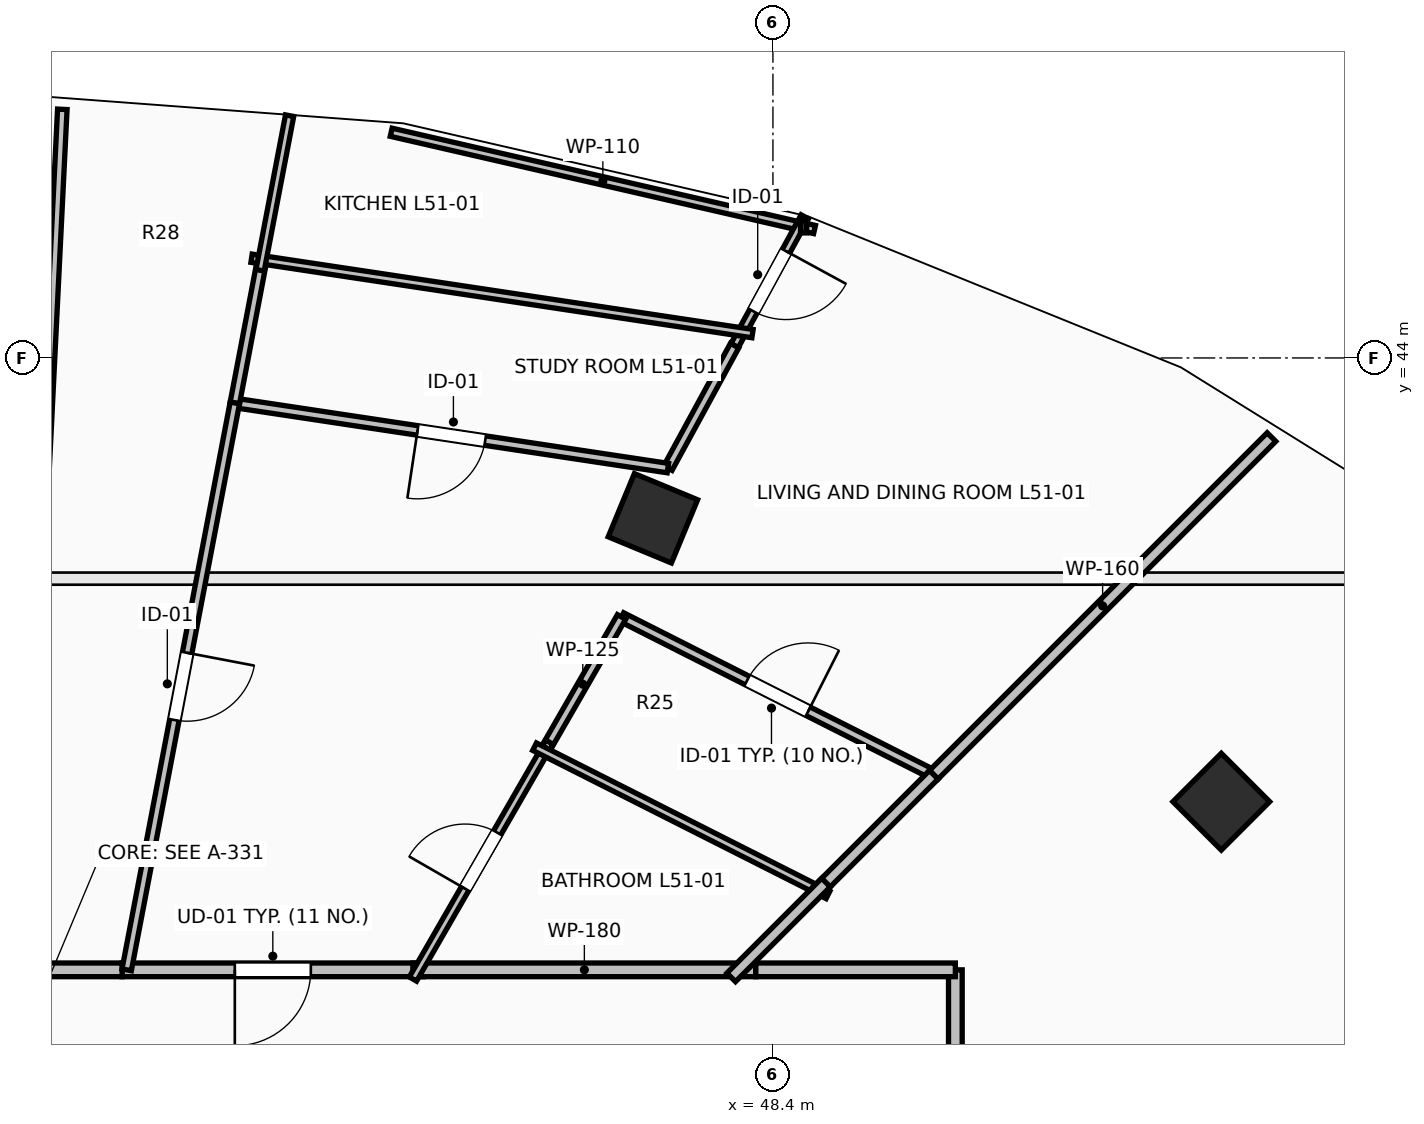
"""IFC4 building model, lengths in metres.
Left out: names, types, materials, properties, quantities, classifications, styles, units other than length and angle.
Written with IfcOpenShell. Run it as: python <this file> out.ifc"""

import sys

from ifc_helpers import new_model, si_unit, direction, frame, frame_2d, origin, origin_2d, place, context, subcontext, project, spatial, rectangle, extrude, element, fill, save


model = new_model("IFC4")
c1 = context("Model", 3, precision=1e-05, world=origin(), true_north=direction((0.0, 1.0)))
c2 = subcontext(c1, "Body", "Model", "MODEL_VIEW")
j1 = project(units=[si_unit("LENGTHUNIT", "METRE"), si_unit("PLANEANGLEUNIT", "RADIAN")], contexts=[c1])
p1 = place(None, origin())
s1 = spatial("IfcSite", under=j1, at=p1, CompositionType="ELEMENT")
p2 = place(p1, origin())
s2 = spatial("IfcBuilding", under=s1, at=p2, CompositionType="ELEMENT")
p3 = place(p2, frame((0.0, 0.0, 189.6)))
s3 = spatial("IfcBuildingStorey", under=s2, at=p3, CompositionType="ELEMENT", Elevation=189.6)
for number, where, z_axis, x_axis in (
    (1, (54.299, 38.162, 0.0), (0.0, 0.0, 1.0), (0.707, 0.707, 0.0)),
    (2, (46.821, 41.891, 0.0), (0.0, 0.0, 1.0), (0.383, 0.924, 0.0)),
):
    element("IfcColumn", number, at=place(p3, frame(where, z_axis=z_axis, x_axis=x_axis)), inside=s3, PredefinedType="COLUMN", context=c2, shape_type="SweptSolid", body=[
        extrude(rectangle(XDim=0.9, YDim=0.9, at=origin_2d()), origin(), (0.0, 0.0, 1.0), 3.5),
    ])
p4 = place(p3, frame((43.803, 35.95, 0.0), z_axis=(0.0, 0.0, 1.0), x_axis=(-1.0, 0.0, 0.0)))
e3 = element("IfcWall", 3, at=p4, inside=s3, PredefinedType="PARTITIONING", context=c2, shape_type="SweptSolid", body=[
    extrude(rectangle(XDim=3.965, YDim=0.18, at=frame_2d((1.982, 0.0))), origin(), (0.0, 0.0, 1.0), 3.24),
])
p5 = place(p4, frame((1.482, 0.0, 0.0)))
e4 = element("IfcOpeningElement", 4, at=p5, cuts=e3, PredefinedType="OPENING", context=c2, shape_type="SweptSolid", body=[
    extrude(rectangle(XDim=1.0, YDim=2.15, at=frame_2d((0.5, 1.075))), frame((0.0, 0.105, 0.0), z_axis=(0.0, -1.0, 0.0), x_axis=(1.0, 0.0, 0.0)), (0.0, 0.0, 1.0), 0.21),
])
p6 = place(p3, frame((48.175, 35.95, 0.0), z_axis=(0.0, 0.0, 1.0), x_axis=(-1.0, 0.0, 0.0)))
e5 = element("IfcWall", 5, at=p6, inside=s3, PredefinedType="PARTITIONING", context=c2, shape_type="SweptSolid", body=[
    extrude(rectangle(XDim=4.512, YDim=0.18, at=frame_2d((2.256, 0.0))), origin(), (0.0, 0.0, 1.0), 2.432),
])
p7 = place(p3, frame((39.838, 35.95, 0.0), z_axis=(0.0, 0.0, 1.0), x_axis=(-1.0, 0.0, 0.0)))
e6 = element("IfcWall", 6, at=p7, inside=s3, PredefinedType="PARTITIONING", context=c2, shape_type="SweptSolid", body=[
    extrude(rectangle(XDim=1.406, YDim=0.18, at=frame_2d((0.703, 0.0))), origin(), (0.0, 0.0, 1.0), 3.24),
])
p8 = place(p3, frame((50.8, 27.25, 0.0), z_axis=(0.0, 0.0, 1.0), x_axis=(0.0, 1.0, 0.0)))
e7 = element("IfcWall", 7, at=p8, inside=s3, PredefinedType="PARTITIONING", context=c2, shape_type="SweptSolid", body=[
    extrude(rectangle(XDim=8.7, YDim=0.18, at=frame_2d((4.35, 0.0))), origin(), (0.0, 0.0, 1.0), 2.432),
])
p9 = place(p3, frame((50.8, 35.95, 0.0), z_axis=(0.0, 0.0, 1.0), x_axis=(-1.0, 0.0, 0.0)))
e8 = element("IfcWall", 8, at=p9, inside=s3, PredefinedType="PARTITIONING", context=c2, shape_type="SweptSolid", body=[
    extrude(rectangle(XDim=2.625, YDim=0.18, at=frame_2d((1.312, 0.0))), origin(), (0.0, 0.0, 1.0), 2.432),
])
p10 = place(p3, frame((46.408, 40.592, 0.0), z_axis=(0.0, 0.0, 1.0), x_axis=(0.89252026196, -0.451007297049, 0.0)))
e9 = element("IfcWall", 9, at=p10, inside=s3, PredefinedType="PARTITIONING", context=c2, shape_type="SweptSolid", body=[
    extrude(rectangle(XDim=4.603, YDim=0.125, at=frame_2d((2.301, 0.0))), origin(), (0.0, 0.0, 1.0), 2.432),
])
p11 = place(p10, frame((1.851, 0.0, 0.0)))
e10 = element("IfcOpeningElement", 10, at=p11, cuts=e9, PredefinedType="OPENING", context=c2, shape_type="SweptSolid", body=[
    extrude(rectangle(XDim=0.9, YDim=2.1, at=frame_2d((0.45, 1.05))), frame((0.0, 0.077, 0.0), z_axis=(0.0, -1.0, 0.0), x_axis=(1.0, 0.0, 0.0)), (0.0, 0.0, 1.0), 0.155),
])
p12 = place(p3, frame((45.389, 38.823, 0.0), z_axis=(0.0, 0.0, 1.0), x_axis=(0.499149502221, 0.866515882389, 0.0)))
e11 = element("IfcWall", 11, at=p12, inside=s3, PredefinedType="PARTITIONING", context=c2, shape_type="SweptSolid", body=[
    extrude(rectangle(XDim=2.042, YDim=0.125, at=frame_2d((1.021, 0.0))), origin(), (0.0, 0.0, 1.0), 2.922),
])
p13 = place(p3, frame((43.664, 35.829, 0.0), z_axis=(0.0, 0.0, 1.0), x_axis=(0.49917767271, 0.866499654396, 0.0)))
e12 = element("IfcWall", 12, at=p13, inside=s3, PredefinedType="PARTITIONING", context=c2, shape_type="SweptSolid", body=[
    extrude(rectangle(XDim=3.596, YDim=0.11, at=frame_2d((1.798, 0.0))), origin(), (0.0, 0.0, 1.0), 2.972),
])
p14 = place(p13, frame((1.373, 0.0, 0.0)))
e13 = element("IfcOpeningElement", 13, at=p14, cuts=e12, PredefinedType="OPENING", context=c2, shape_type="SweptSolid", body=[
    extrude(rectangle(XDim=0.85, YDim=2.1, at=frame_2d((0.425, 1.05))), frame((0.0, 0.07, 0.0), z_axis=(0.0, -1.0, 0.0), x_axis=(1.0, 0.0, 0.0)), (0.0, 0.0, 1.0), 0.14),
])
p15 = place(p3, frame((48.948, 45.69, 0.0), z_axis=(0.0, 0.0, 1.0), x_axis=(-0.974613198555, 0.223895317508, 0.0)))
e14 = element("IfcWall", 14, at=p15, inside=s3, PredefinedType="PARTITIONING", context=c2, shape_type="SweptSolid", body=[
    extrude(rectangle(XDim=5.715, YDim=0.11, at=frame_2d((2.857, 0.0))), origin(), (0.0, 0.0, 1.0), 3.24),
])
p16 = place(p3, frame((48.819, 45.857, 0.0), z_axis=(0.0, 0.0, 1.0), x_axis=(-0.478311376557, -0.878190313689, 0.0)))
e15 = element("IfcWall", 15, at=p16, inside=s3, PredefinedType="PARTITIONING", context=c2, shape_type="SweptSolid", body=[
    extrude(rectangle(XDim=1.93, YDim=0.11, at=frame_2d((0.965, 0.0))), origin(), (0.0, 0.0, 1.0), 3.24),
])
p17 = place(p16, frame((0.515, 0.0, 0.0)))
e16 = element("IfcOpeningElement", 16, at=p17, cuts=e15, PredefinedType="OPENING", context=c2, shape_type="SweptSolid", body=[
    extrude(rectangle(XDim=0.9, YDim=2.1, at=frame_2d((0.45, 1.05))), frame((0.0, 0.07, 0.0), z_axis=(0.0, -1.0, 0.0), x_axis=(1.0, 0.0, 0.0)), (0.0, 0.0, 1.0), 0.14),
])
p18 = place(p3, frame((47.896, 44.162, 0.0), z_axis=(0.0, 0.0, 1.0), x_axis=(-0.47839521225, -0.87814464691, 0.0)))
e17 = element("IfcWall", 17, at=p18, inside=s3, PredefinedType="PARTITIONING", context=c2, shape_type="SweptSolid", body=[
    extrude(rectangle(XDim=1.835, YDim=0.125, at=frame_2d((0.917, 0.0))), origin(), (0.0, 0.0, 1.0), 3.24),
])
p19 = place(p3, frame((47.018, 42.551, 0.0), z_axis=(0.0, 0.0, 1.0), x_axis=(-0.98887565722, 0.148744527827, 0.0)))
e18 = element("IfcWall", 18, at=p19, inside=s3, PredefinedType="PARTITIONING", context=c2, shape_type="SweptSolid", body=[
    extrude(rectangle(XDim=5.761, YDim=0.125, at=frame_2d((2.881, 0.0))), origin(), (0.0, 0.0, 1.0), 3.24),
])
p20 = place(p19, frame((2.43, 0.0, 0.0)))
e19 = element("IfcOpeningElement", 19, at=p20, cuts=e18, PredefinedType="OPENING", context=c2, shape_type="SweptSolid", body=[
    extrude(rectangle(XDim=0.9, YDim=2.1, at=frame_2d((0.45, 1.05))), frame((0.0, 0.077, 0.0), z_axis=(0.0, -1.0, 0.0), x_axis=(1.0, 0.0, 0.0)), (0.0, 0.0, 1.0), 0.155),
])
p21 = place(p3, frame((41.321, 43.408, 0.0), z_axis=(0.0, 0.0, 1.0), x_axis=(0.187217449549, 0.982318495491, 0.0)))
e20 = element("IfcWall", 20, at=p21, inside=s3, PredefinedType="PARTITIONING", context=c2, shape_type="SweptSolid", body=[
    extrude(rectangle(XDim=1.917, YDim=0.125, at=frame_2d((0.958, 0.0))), origin(), (0.0, 0.0, 1.0), 3.24),
])
p22 = place(p3, frame((41.321, 43.408, 0.0), z_axis=(0.0, 0.0, 1.0), x_axis=(-0.187401709503, -0.982283359971, 0.0)))
e21 = element("IfcWall", 21, at=p22, inside=s3, PredefinedType="PARTITIONING", context=c2, shape_type="SweptSolid", body=[
    extrude(rectangle(XDim=7.593, YDim=0.125, at=frame_2d((3.796, 0.0))), origin(), (0.0, 0.0, 1.0), 2.774),
])
p23 = place(p22, frame((3.346, 0.0, 0.0)))
e22 = element("IfcOpeningElement", 22, at=p23, cuts=e21, PredefinedType="OPENING", context=c2, shape_type="SweptSolid", body=[
    extrude(rectangle(XDim=0.9, YDim=2.1, at=frame_2d((0.45, 1.05))), frame((0.0, 0.077, 0.0), z_axis=(0.0, -1.0, 0.0), x_axis=(1.0, 0.0, 0.0)), (0.0, 0.0, 1.0), 0.155),
])
p24 = place(p3, frame((50.516, 38.516, 0.0), z_axis=(0.0, 0.0, 1.0), x_axis=(0.707106781187, 0.707106781187, 0.0)))
e23 = element("IfcWall", 23, at=p24, inside=s3, PredefinedType="PARTITIONING", context=c2, shape_type="SweptSolid", body=[
    extrude(rectangle(XDim=6.283, YDim=0.16, at=frame_2d((3.142, 0.0))), origin(), (0.0, 0.0, 1.0), 2.774),
])
p25 = place(p3, frame((45.264, 38.886, 0.0), z_axis=(0.0, 0.0, 1.0), x_axis=(0.892556527512, -0.450935522216, 0.0)))
e24 = element("IfcWall", 24, at=p25, inside=s3, PredefinedType="PARTITIONING", context=c2, shape_type="SweptSolid", body=[
    extrude(rectangle(XDim=4.325, YDim=0.11, at=frame_2d((2.162, 0.0))), origin(), (0.0, 0.0, 1.0), 2.432),
])
p26 = place(p3, frame((48.999, 36.999, 0.0), z_axis=(0.0, 0.0, 1.0), x_axis=(0.707106781187, 0.707106781187, 0.0)))
e25 = element("IfcWall", 25, at=p26, inside=s3, PredefinedType="PARTITIONING", context=c2, shape_type="SweptSolid", body=[
    extrude(rectangle(XDim=2.146, YDim=0.16, at=frame_2d((1.073, 0.0))), origin(), (0.0, 0.0, 1.0), 2.922),
])
p27 = place(p3, frame((47.851, 35.851, 0.0), z_axis=(0.0, 0.0, 1.0), x_axis=(0.707106781187, 0.707106781187, 0.0)))
e26 = element("IfcWall", 26, at=p27, inside=s3, PredefinedType="PARTITIONING", context=c2, shape_type="SweptSolid", body=[
    extrude(rectangle(XDim=1.763, YDim=0.16, at=frame_2d((0.882, 0.0))), origin(), (0.0, 0.0, 1.0), 2.432),
])
p28 = place(p3, frame((41.541, 45.312, 0.0), z_axis=(0.0, 0.0, 1.0), x_axis=(0.988873931206, -0.148756002172, 0.0)))
e27 = element("IfcWall", 27, at=p28, inside=s3, PredefinedType="PARTITIONING", context=c2, shape_type="SweptSolid", body=[
    extrude(rectangle(XDim=6.665, YDim=0.11, at=frame_2d((3.333, 0.0))), origin(), (0.0, 0.0, 1.0), 3.24),
])
p29 = place(p3, frame((42.041, 47.188, 0.0), z_axis=(0.0, 0.0, 1.0), x_axis=(-0.187605166264, -0.982244522301, 0.0)))
e28 = element("IfcWall", 28, at=p29, inside=s3, PredefinedType="PARTITIONING", context=c2, shape_type="SweptSolid", body=[
    extrude(rectangle(XDim=2.071, YDim=0.11, at=frame_2d((1.035, 0.0))), origin(), (0.0, 0.0, 1.0), 3.24),
])
p30 = place(p3, frame((39.051, 47.271, 0.0), z_axis=(0.0, 0.0, 1.0), x_axis=(-0.049324203907, -0.998782820692, 0.0)))
e29 = element("IfcWall", 29, at=p30, inside=s3, PredefinedType="PARTITIONING", context=c2, shape_type="SweptSolid", body=[
    extrude(rectangle(XDim=11.335, YDim=0.125, at=frame_2d((5.667, 0.0))), origin(), (0.0, 0.0, 1.0), 2.774),
])
p31 = place(p5, origin())
e30 = element("IfcDoor", 30, at=p31, inside=s3, OperationType="SINGLE_SWING_RIGHT", PredefinedType="DOOR", context=c2, shape_type="SweptSolid", body=[
    extrude(rectangle(XDim=1.0, YDim=2.15, at=frame_2d((0.5, 1.075))), frame((0.0, 0.025, 0.0), z_axis=(0.0, -1.0, 0.0), x_axis=(1.0, 0.0, 0.0)), (0.0, 0.0, 1.0), 0.05),
])
fill(e4, e30)
p32 = place(p11, origin())
e31 = element("IfcDoor", 31, at=p32, inside=s3, OperationType="SINGLE_SWING_RIGHT", PredefinedType="DOOR", context=c2, shape_type="SweptSolid", body=[
    extrude(rectangle(XDim=0.9, YDim=2.1, at=frame_2d((0.45, 1.05))), frame((0.0, 0.025, 0.0), z_axis=(0.0, -1.0, 0.0), x_axis=(1.0, 0.0, 0.0)), (0.0, 0.0, 1.0), 0.05),
])
fill(e10, e31)
p33 = place(p14, origin())
e32 = element("IfcDoor", 32, at=p33, inside=s3, OperationType="SINGLE_SWING_LEFT", PredefinedType="DOOR", context=c2, shape_type="SweptSolid", body=[
    extrude(rectangle(XDim=0.85, YDim=2.1, at=frame_2d((0.425, 1.05))), frame((0.0, 0.025, 0.0), z_axis=(0.0, -1.0, 0.0), x_axis=(1.0, 0.0, 0.0)), (0.0, 0.0, 1.0), 0.05),
])
fill(e13, e32)
p34 = place(p17, origin())
e33 = element("IfcDoor", 33, at=p34, inside=s3, OperationType="SINGLE_SWING_LEFT", PredefinedType="DOOR", context=c2, shape_type="SweptSolid", body=[
    extrude(rectangle(XDim=0.9, YDim=2.1, at=frame_2d((0.45, 1.05))), frame((0.0, 0.025, 0.0), z_axis=(0.0, -1.0, 0.0), x_axis=(1.0, 0.0, 0.0)), (0.0, 0.0, 1.0), 0.05),
])
fill(e16, e33)
p35 = place(p20, origin())
e34 = element("IfcDoor", 34, at=p35, inside=s3, OperationType="SINGLE_SWING_RIGHT", PredefinedType="DOOR", context=c2, shape_type="SweptSolid", body=[
    extrude(rectangle(XDim=0.9, YDim=2.1, at=frame_2d((0.45, 1.05))), frame((0.0, 0.025, 0.0), z_axis=(0.0, -1.0, 0.0), x_axis=(1.0, 0.0, 0.0)), (0.0, 0.0, 1.0), 0.05),
])
fill(e19, e34)
p36 = place(p23, origin())
e35 = element("IfcDoor", 35, at=p36, inside=s3, OperationType="SINGLE_SWING_LEFT", PredefinedType="DOOR", context=c2, shape_type="SweptSolid", body=[
    extrude(rectangle(XDim=0.9, YDim=2.1, at=frame_2d((0.45, 1.05))), frame((0.0, 0.025, 0.0), z_axis=(0.0, -1.0, 0.0), x_axis=(1.0, 0.0, 0.0)), (0.0, 0.0, 1.0), 0.05),
])
fill(e22, e35)
save(model, sys.argv[1])
